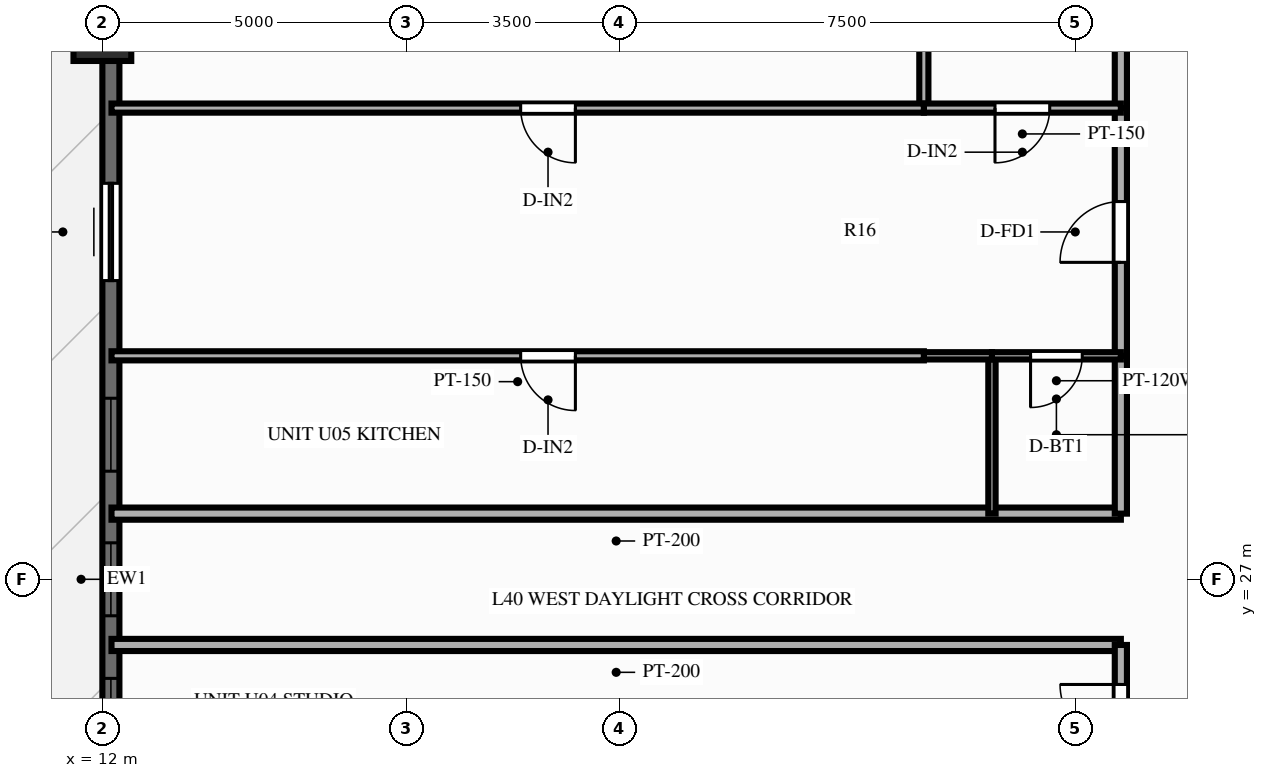
"""IFC4 building model, lengths in metres.
Left out: names, types, materials, properties, quantities, classifications, styles, units other than length and angle.
Written with IfcOpenShell. Run it as: python <this file> out.ifc"""

import sys

from ifc_helpers import new_model, si_unit, direction, frame, frame_2d, origin, origin_2d, place, context, subcontext, project, spatial, rectangle, extrude, source, transform, mapped, element, fill, save


model = new_model("IFC4")
c1 = context("Model", 3, precision=1e-05, world=origin(), true_north=direction((0.0, 1.0)))
c2 = subcontext(c1, "Body", "Model", "MODEL_VIEW")
j1 = project(units=[si_unit("LENGTHUNIT", "METRE"), si_unit("PLANEANGLEUNIT", "RADIAN")], contexts=[c1])
p1 = place(None, origin())
s1 = spatial("IfcSite", under=j1, at=p1, CompositionType="ELEMENT")
p2 = place(p1, origin())
s2 = spatial("IfcBuilding", under=s1, at=p2, CompositionType="ELEMENT")
p3 = place(p2, frame((0.0, 0.0, 126.75)))
s3 = spatial("IfcBuildingStorey", under=s2, at=p3, CompositionType="ELEMENT", Elevation=126.75)
m1 = source(origin(), c2, "Body", "SweptSolid", [
    extrude(rectangle(XDim=0.95, YDim=0.95, at=origin_2d()), origin(), (0.0, 0.0, 1.0), 3.0),
])
p4 = place(p3, frame((12.0, 36.0, 0.0), z_axis=(0.0, 0.0, 1.0), x_axis=(1.0, 0.0, 0.0)))
e1 = element("IfcColumn", 1, at=p4, inside=s3, PredefinedType="COLUMN", context=c2, shape_type="MappedRepresentation", body=[
    mapped(m1, transform((0.0, 0.0, 0.0), scale=1.0)),
])
p5 = place(p3, frame((12.14, 7.2, 0.0), z_axis=(0.0, 0.0, 1.0), x_axis=(0.0, 1.0, 0.0)))
e2 = element("IfcWall", 2, at=p5, inside=s3, PredefinedType="SOLIDWALL", context=c2, shape_type="SweptSolid", body=[
    extrude(rectangle(XDim=39.6, YDim=0.28, at=frame_2d((19.8, 0.0))), origin(), (0.0, 0.0, 1.0), 2.28),
])
p6 = place(p5, frame((0.949, 0.0, 0.25)))
e3 = element("IfcOpeningElement", 3, at=p6, cuts=e2, PredefinedType="OPENING", context=c2, shape_type="SweptSolid", body=[
    extrude(rectangle(XDim=1.2, YDim=1.5, at=frame_2d((0.6, 0.75))), frame((0.0, 0.152, 0.0), z_axis=(0.0, -1.0, 0.0), x_axis=(1.0, 0.0, 0.0)), (0.0, 0.0, 1.0), 0.304),
])
p7 = place(p5, frame((3.292, 0.0, 0.25)))
e4 = element("IfcOpeningElement", 4, at=p7, cuts=e2, PredefinedType="OPENING", context=c2, shape_type="SweptSolid", body=[
    extrude(rectangle(XDim=1.2, YDim=1.5, at=frame_2d((0.6, 0.75))), frame((0.0, 0.152, 0.0), z_axis=(0.0, -1.0, 0.0), x_axis=(1.0, 0.0, 0.0)), (0.0, 0.0, 1.0), 0.304),
])
p8 = place(p5, frame((5.702, 0.0, 0.25)))
e5 = element("IfcOpeningElement", 5, at=p8, cuts=e2, PredefinedType="OPENING", context=c2, shape_type="SweptSolid", body=[
    extrude(rectangle(XDim=1.2, YDim=1.5, at=frame_2d((0.6, 0.75))), frame((0.0, 0.152, 0.0), z_axis=(0.0, -1.0, 0.0), x_axis=(1.0, 0.0, 0.0)), (0.0, 0.0, 1.0), 0.304),
])
p9 = place(p5, frame((8.112, 0.0, 0.25)))
e6 = element("IfcOpeningElement", 6, at=p9, cuts=e2, PredefinedType="OPENING", context=c2, shape_type="SweptSolid", body=[
    extrude(rectangle(XDim=1.2, YDim=1.5, at=frame_2d((0.6, 0.75))), frame((0.0, 0.152, 0.0), z_axis=(0.0, -1.0, 0.0), x_axis=(1.0, 0.0, 0.0)), (0.0, 0.0, 1.0), 0.304),
])
p10 = place(p5, frame((12.521, 0.0, 0.25)))
e7 = element("IfcOpeningElement", 7, at=p10, cuts=e2, PredefinedType="OPENING", context=c2, shape_type="SweptSolid", body=[
    extrude(rectangle(XDim=1.2, YDim=1.5, at=frame_2d((0.6, 0.75))), frame((0.0, 0.152, 0.0), z_axis=(0.0, -1.0, 0.0), x_axis=(1.0, 0.0, 0.0)), (0.0, 0.0, 1.0), 0.304),
])
p11 = place(p5, frame((14.745, 0.0, 0.25)))
e8 = element("IfcOpeningElement", 8, at=p11, cuts=e2, PredefinedType="OPENING", context=c2, shape_type="SweptSolid", body=[
    extrude(rectangle(XDim=1.2, YDim=1.5, at=frame_2d((0.6, 0.75))), frame((0.0, 0.152, 0.0), z_axis=(0.0, -1.0, 0.0), x_axis=(1.0, 0.0, 0.0)), (0.0, 0.0, 1.0), 0.304),
])
p12 = place(p5, frame((16.97, 0.0, 0.25)))
e9 = element("IfcOpeningElement", 9, at=p12, cuts=e2, PredefinedType="OPENING", context=c2, shape_type="SweptSolid", body=[
    extrude(rectangle(XDim=1.2, YDim=1.5, at=frame_2d((0.6, 0.75))), frame((0.0, 0.152, 0.0), z_axis=(0.0, -1.0, 0.0), x_axis=(1.0, 0.0, 0.0)), (0.0, 0.0, 1.0), 0.304),
])
p13 = place(p5, frame((19.2, 0.0, 0.25)))
e10 = element("IfcOpeningElement", 10, at=p13, cuts=e2, PredefinedType="OPENING", context=c2, shape_type="SweptSolid", body=[
    extrude(rectangle(XDim=1.2, YDim=1.5, at=frame_2d((0.6, 0.75))), frame((0.0, 0.152, 0.0), z_axis=(0.0, -1.0, 0.0), x_axis=(1.0, 0.0, 0.0)), (0.0, 0.0, 1.0), 0.304),
])
p14 = place(p5, frame((21.578, 0.0, 0.25)))
e11 = element("IfcOpeningElement", 11, at=p14, cuts=e2, PredefinedType="OPENING", context=c2, shape_type="SweptSolid", body=[
    extrude(rectangle(XDim=1.2, YDim=1.5, at=frame_2d((0.6, 0.75))), frame((0.0, 0.152, 0.0), z_axis=(0.0, -1.0, 0.0), x_axis=(1.0, 0.0, 0.0)), (0.0, 0.0, 1.0), 0.304),
])
p15 = place(p5, frame((24.713, 0.0, 0.0)))
e12 = element("IfcOpeningElement", 12, at=p15, cuts=e2, PredefinedType="OPENING", context=c2, shape_type="SweptSolid", body=[
    extrude(rectangle(XDim=1.6, YDim=2.15, at=frame_2d((0.8, 1.075))), frame((0.0, 0.152, 0.0), z_axis=(0.0, -1.0, 0.0), x_axis=(1.0, 0.0, 0.0)), (0.0, 0.0, 1.0), 0.304),
])
p16 = place(p5, frame((29.305, 0.0, 0.25)))
e13 = element("IfcOpeningElement", 13, at=p16, cuts=e2, PredefinedType="OPENING", context=c2, shape_type="SweptSolid", body=[
    extrude(rectangle(XDim=0.7, YDim=1.5, at=frame_2d((0.35, 0.75))), frame((0.0, 0.152, 0.0), z_axis=(0.0, -1.0, 0.0), x_axis=(1.0, 0.0, 0.0)), (0.0, 0.0, 1.0), 0.304),
])
p17 = place(p5, frame((30.848, 0.0, 0.25)))
e14 = element("IfcOpeningElement", 14, at=p17, cuts=e2, PredefinedType="OPENING", context=c2, shape_type="SweptSolid", body=[
    extrude(rectangle(XDim=1.2, YDim=1.5, at=frame_2d((0.6, 0.75))), frame((0.0, 0.152, 0.0), z_axis=(0.0, -1.0, 0.0), x_axis=(1.0, 0.0, 0.0)), (0.0, 0.0, 1.0), 0.304),
])
p18 = place(p5, frame((34.183, 0.0, 0.25)))
e15 = element("IfcOpeningElement", 15, at=p18, cuts=e2, PredefinedType="OPENING", context=c2, shape_type="SweptSolid", body=[
    extrude(rectangle(XDim=1.2, YDim=1.5, at=frame_2d((0.6, 0.75))), frame((0.0, 0.152, 0.0), z_axis=(0.0, -1.0, 0.0), x_axis=(1.0, 0.0, 0.0)), (0.0, 0.0, 1.0), 0.304),
])
p19 = place(p5, frame((37.452, 0.0, 0.25)))
e16 = element("IfcOpeningElement", 16, at=p19, cuts=e2, PredefinedType="OPENING", context=c2, shape_type="SweptSolid", body=[
    extrude(rectangle(XDim=1.2, YDim=1.5, at=frame_2d((0.6, 0.75))), frame((0.0, 0.152, 0.0), z_axis=(0.0, -1.0, 0.0), x_axis=(1.0, 0.0, 0.0)), (0.0, 0.0, 1.0), 0.304),
])
p20 = place(p3, frame((28.75, 25.92, 0.0), z_axis=(0.0, 0.0, 1.0), x_axis=(-1.0, 0.0, 0.0)))
e17 = element("IfcWall", 17, at=p20, inside=s3, PredefinedType="PARTITIONING", context=c2, shape_type="SweptSolid", body=[
    extrude(rectangle(XDim=16.6, YDim=0.2, at=frame_2d((8.3, 0.0))), origin(), (0.0, 0.0, 1.0), 2.79),
])
p21 = place(p3, frame((28.75, 23.62, 0.0), z_axis=(0.0, 0.0, 1.0), x_axis=(0.0, 1.0, 0.0)))
e18 = element("IfcWall", 18, at=p21, inside=s3, PredefinedType="PARTITIONING", context=c2, shape_type="SweptSolid", body=[
    extrude(rectangle(XDim=2.3, YDim=0.2, at=frame_2d((1.15, 0.0))), origin(), (0.0, 0.0, 1.0), 2.79),
])
p22 = place(p21, frame((0.65, 0.0, 0.0)))
e19 = element("IfcOpeningElement", 19, at=p22, cuts=e18, PredefinedType="OPENING", context=c2, shape_type="SweptSolid", body=[
    extrude(rectangle(XDim=1.0, YDim=2.15, at=frame_2d((0.5, 1.075))), frame((0.0, 0.112, 0.0), z_axis=(0.0, -1.0, 0.0), x_axis=(1.0, 0.0, 0.0)), (0.0, 0.0, 1.0), 0.224),
])
p23 = place(p3, frame((28.75, 28.08, 0.0), z_axis=(0.0, 0.0, 1.0), x_axis=(-1.0, 0.0, 0.0)))
e20 = element("IfcWall", 20, at=p23, inside=s3, PredefinedType="PARTITIONING", context=c2, shape_type="SweptSolid", body=[
    extrude(rectangle(XDim=16.6, YDim=0.2, at=frame_2d((8.3, 0.0))), origin(), (0.0, 0.0, 1.0), 2.79),
])
p24 = place(p3, frame((28.75, 28.08, 0.0), z_axis=(0.0, 0.0, 1.0), x_axis=(0.0, 1.0, 0.0)))
e21 = element("IfcWall", 21, at=p24, inside=s3, PredefinedType="PARTITIONING", context=c2, shape_type="SweptSolid", body=[
    extrude(rectangle(XDim=2.595, YDim=0.2, at=frame_2d((1.298, 0.0))), origin(), (0.0, 0.0, 1.0), 2.79),
])
p25 = place(p3, frame((28.75, 30.676, 0.0), z_axis=(0.0, 0.0, 1.0), x_axis=(0.0, 1.0, 0.0)))
e22 = element("IfcWall", 22, at=p25, inside=s3, PredefinedType="PARTITIONING", context=c2, shape_type="SweptSolid", body=[
    extrude(rectangle(XDim=4.074, YDim=0.2, at=frame_2d((2.037, 0.0))), origin(), (0.0, 0.0, 1.0), 2.79),
])
p26 = place(p25, frame((1.537, 0.0, 0.0)))
e23 = element("IfcOpeningElement", 23, at=p26, cuts=e22, PredefinedType="OPENING", context=c2, shape_type="SweptSolid", body=[
    extrude(rectangle(XDim=1.0, YDim=2.15, at=frame_2d((0.5, 1.075))), frame((0.0, 0.112, 0.0), z_axis=(0.0, -1.0, 0.0), x_axis=(1.0, 0.0, 0.0)), (0.0, 0.0, 1.0), 0.224),
])
p27 = place(p3, frame((28.75, 34.75, 0.0), z_axis=(0.0, 0.0, 1.0), x_axis=(0.0, 1.0, 0.0)))
e24 = element("IfcWall", 24, at=p27, inside=s3, PredefinedType="PARTITIONING", context=c2, shape_type="SweptSolid", body=[
    extrude(rectangle(XDim=2.6, YDim=0.2, at=frame_2d((1.3, 0.0))), origin(), (0.0, 0.0, 1.0), 2.79),
])
p28 = place(p3, frame((26.63, 28.08, 0.0), z_axis=(0.0, 0.0, 1.0), x_axis=(0.0, 1.0, 0.0)))
e25 = element("IfcWall", 25, at=p28, inside=s3, PredefinedType="PARTITIONING", context=c2, shape_type="SweptSolid", body=[
    extrude(rectangle(XDim=2.595, YDim=0.12, at=frame_2d((1.298, 0.0))), origin(), (0.0, 0.0, 1.0), 2.79),
])
p29 = place(p3, frame((25.51, 34.75, 0.0), z_axis=(0.0, 0.0, 1.0), x_axis=(0.0, 1.0, 0.0)))
e26 = element("IfcWall", 26, at=p29, inside=s3, PredefinedType="PARTITIONING", context=c2, shape_type="SweptSolid", body=[
    extrude(rectangle(XDim=2.6, YDim=0.15, at=frame_2d((1.3, 0.0))), origin(), (0.0, 0.0, 1.0), 2.79),
])
p30 = place(p3, frame((28.75, 30.676, 0.0), z_axis=(0.0, 0.0, 1.0), x_axis=(-1.0, 0.0, 0.0)))
e27 = element("IfcWall", 27, at=p30, inside=s3, PredefinedType="PARTITIONING", context=c2, shape_type="SweptSolid", body=[
    extrude(rectangle(XDim=2.12, YDim=0.12, at=frame_2d((1.06, 0.0))), origin(), (0.0, 0.0, 1.0), 2.79),
])
p31 = place(p30, frame((0.635, 0.0, 0.0)))
e28 = element("IfcOpeningElement", 28, at=p31, cuts=e27, PredefinedType="OPENING", context=c2, shape_type="SweptSolid", body=[
    extrude(rectangle(XDim=0.85, YDim=2.05, at=frame_2d((0.425, 1.025))), frame((0.0, 0.072, 0.0), z_axis=(0.0, -1.0, 0.0), x_axis=(1.0, 0.0, 0.0)), (0.0, 0.0, 1.0), 0.144),
])
p32 = place(p3, frame((26.63, 30.676, 0.0), z_axis=(0.0, 0.0, 1.0), x_axis=(-1.0, 0.0, 0.0)))
e29 = element("IfcWall", 29, at=p32, inside=s3, PredefinedType="PARTITIONING", context=c2, shape_type="SweptSolid", body=[
    extrude(rectangle(XDim=1.12, YDim=0.12, at=frame_2d((0.56, 0.0))), origin(), (0.0, 0.0, 1.0), 2.79),
])
p33 = place(p3, frame((25.51, 30.676, 0.0), z_axis=(0.0, 0.0, 1.0), x_axis=(-1.0, 0.0, 0.0)))
e30 = element("IfcWall", 30, at=p33, inside=s3, PredefinedType="PARTITIONING", context=c2, shape_type="SweptSolid", body=[
    extrude(rectangle(XDim=13.36, YDim=0.15, at=frame_2d((6.68, 0.0))), origin(), (0.0, 0.0, 1.0), 2.79),
])
p34 = place(p33, frame((5.731, 0.0, 0.0)))
e31 = element("IfcOpeningElement", 31, at=p34, cuts=e30, PredefinedType="OPENING", context=c2, shape_type="SweptSolid", body=[
    extrude(rectangle(XDim=0.9, YDim=2.1, at=frame_2d((0.45, 1.05))), frame((0.0, 0.087, 0.0), z_axis=(0.0, -1.0, 0.0), x_axis=(1.0, 0.0, 0.0)), (0.0, 0.0, 1.0), 0.174),
])
p35 = place(p3, frame((28.75, 34.75, 0.0), z_axis=(0.0, 0.0, 1.0), x_axis=(-1.0, 0.0, 0.0)))
e32 = element("IfcWall", 32, at=p35, inside=s3, PredefinedType="PARTITIONING", context=c2, shape_type="SweptSolid", body=[
    extrude(rectangle(XDim=3.24, YDim=0.15, at=frame_2d((1.62, 0.0))), origin(), (0.0, 0.0, 1.0), 2.79),
])
p36 = place(p35, frame((1.17, 0.0, 0.0)))
e33 = element("IfcOpeningElement", 33, at=p36, cuts=e32, PredefinedType="OPENING", context=c2, shape_type="SweptSolid", body=[
    extrude(rectangle(XDim=0.9, YDim=2.1, at=frame_2d((0.45, 1.05))), frame((0.0, 0.087, 0.0), z_axis=(0.0, -1.0, 0.0), x_axis=(1.0, 0.0, 0.0)), (0.0, 0.0, 1.0), 0.174),
])
p37 = place(p3, frame((25.51, 34.75, 0.0), z_axis=(0.0, 0.0, 1.0), x_axis=(-1.0, 0.0, 0.0)))
e34 = element("IfcWall", 34, at=p37, inside=s3, PredefinedType="PARTITIONING", context=c2, shape_type="SweptSolid", body=[
    extrude(rectangle(XDim=13.36, YDim=0.15, at=frame_2d((6.68, 0.0))), origin(), (0.0, 0.0, 1.0), 2.79),
])
p38 = place(p37, frame((5.731, 0.0, 0.0)))
e35 = element("IfcOpeningElement", 35, at=p38, cuts=e34, PredefinedType="OPENING", context=c2, shape_type="SweptSolid", body=[
    extrude(rectangle(XDim=0.9, YDim=2.1, at=frame_2d((0.45, 1.05))), frame((0.0, 0.087, 0.0), z_axis=(0.0, -1.0, 0.0), x_axis=(1.0, 0.0, 0.0)), (0.0, 0.0, 1.0), 0.174),
])
m2 = source(origin(), c2, "Body", "SweptSolid", [
    extrude(rectangle(XDim=1.2, YDim=1.5, at=frame_2d((0.6, 0.75))), frame((0.0, 0.03, 0.0), z_axis=(0.0, -1.0, 0.0), x_axis=(1.0, 0.0, 0.0)), (0.0, 0.0, 1.0), 0.06),
])
p39 = place(p12, origin())
e36 = element("IfcWindow", 36, at=p39, inside=s3, PartitioningType="SINGLE_PANEL", PredefinedType="WINDOW", context=c2, shape_type="MappedRepresentation", body=[
    mapped(m2, transform((0.0, 0.0, 0.0), scale=1.0)),
])
fill(e9, e36)
p40 = place(p13, origin())
e37 = element("IfcWindow", 37, at=p40, inside=s3, PartitioningType="SINGLE_PANEL", PredefinedType="WINDOW", context=c2, shape_type="MappedRepresentation", body=[
    mapped(m2, transform((0.0, 0.0, 0.0), scale=1.0)),
])
fill(e10, e37)
p41 = place(p14, origin())
e38 = element("IfcWindow", 38, at=p41, inside=s3, PartitioningType="SINGLE_PANEL", PredefinedType="WINDOW", context=c2, shape_type="MappedRepresentation", body=[
    mapped(m2, transform((0.0, 0.0, 0.0), scale=1.0)),
])
fill(e11, e38)
m3 = source(origin(), c2, "Body", "SweptSolid", [
    extrude(rectangle(XDim=1.6, YDim=2.15, at=frame_2d((0.8, 1.075))), frame((0.0, 0.025, 0.0), z_axis=(0.0, -1.0, 0.0), x_axis=(1.0, 0.0, 0.0)), (0.0, 0.0, 1.0), 0.05),
])
p42 = place(p15, origin())
e39 = element("IfcDoor", 39, at=p42, inside=s3, OperationType="SLIDING_TO_LEFT", PredefinedType="DOOR", context=c2, shape_type="MappedRepresentation", body=[
    mapped(m3, transform((0.0, 0.0, 0.0), scale=1.0)),
])
fill(e12, e39)
m4 = source(origin(), c2, "Body", "SweptSolid", [
    extrude(rectangle(XDim=1.0, YDim=2.15, at=frame_2d((0.5, 1.075))), frame((0.0, 0.025, 0.0), z_axis=(0.0, -1.0, 0.0), x_axis=(1.0, 0.0, 0.0)), (0.0, 0.0, 1.0), 0.05),
])
p43 = place(p22, origin())
e40 = element("IfcDoor", 40, at=p43, inside=s3, OperationType="SINGLE_SWING_RIGHT", PredefinedType="DOOR", context=c2, shape_type="MappedRepresentation", body=[
    mapped(m4, transform((0.0, 0.0, 0.0), scale=1.0)),
])
fill(e19, e40)
p44 = place(p26, origin())
e41 = element("IfcDoor", 41, at=p44, inside=s3, OperationType="SINGLE_SWING_LEFT", PredefinedType="DOOR", context=c2, shape_type="MappedRepresentation", body=[
    mapped(m4, transform((0.0, 0.0, 0.0), scale=1.0)),
])
fill(e23, e41)
m5 = source(origin(), c2, "Body", "SweptSolid", [
    extrude(rectangle(XDim=0.85, YDim=2.05, at=frame_2d((0.425, 1.025))), frame((0.0, 0.025, 0.0), z_axis=(0.0, -1.0, 0.0), x_axis=(1.0, 0.0, 0.0)), (0.0, 0.0, 1.0), 0.05),
])
p45 = place(p31, origin())
e42 = element("IfcDoor", 42, at=p45, inside=s3, OperationType="SINGLE_SWING_RIGHT", PredefinedType="DOOR", context=c2, shape_type="MappedRepresentation", body=[
    mapped(m5, transform((0.0, 0.0, 0.0), scale=1.0)),
])
fill(e28, e42)
m6 = source(origin(), c2, "Body", "SweptSolid", [
    extrude(rectangle(XDim=0.9, YDim=2.1, at=frame_2d((0.45, 1.05))), frame((0.0, 0.025, 0.0), z_axis=(0.0, -1.0, 0.0), x_axis=(1.0, 0.0, 0.0)), (0.0, 0.0, 1.0), 0.05),
])
p46 = place(p34, origin())
e43 = element("IfcDoor", 43, at=p46, inside=s3, OperationType="SINGLE_SWING_LEFT", PredefinedType="DOOR", context=c2, shape_type="MappedRepresentation", body=[
    mapped(m6, transform((0.0, 0.0, 0.0), scale=1.0)),
])
fill(e31, e43)
p47 = place(p36, origin())
e44 = element("IfcDoor", 44, at=p47, inside=s3, OperationType="SINGLE_SWING_RIGHT", PredefinedType="DOOR", context=c2, shape_type="MappedRepresentation", body=[
    mapped(m6, transform((0.0, 0.0, 0.0), scale=1.0)),
])
fill(e33, e44)
p48 = place(p38, origin())
e45 = element("IfcDoor", 45, at=p48, inside=s3, OperationType="SINGLE_SWING_LEFT", PredefinedType="DOOR", context=c2, shape_type="MappedRepresentation", body=[
    mapped(m6, transform((0.0, 0.0, 0.0), scale=1.0)),
])
fill(e35, e45)
save(model, sys.argv[1])
